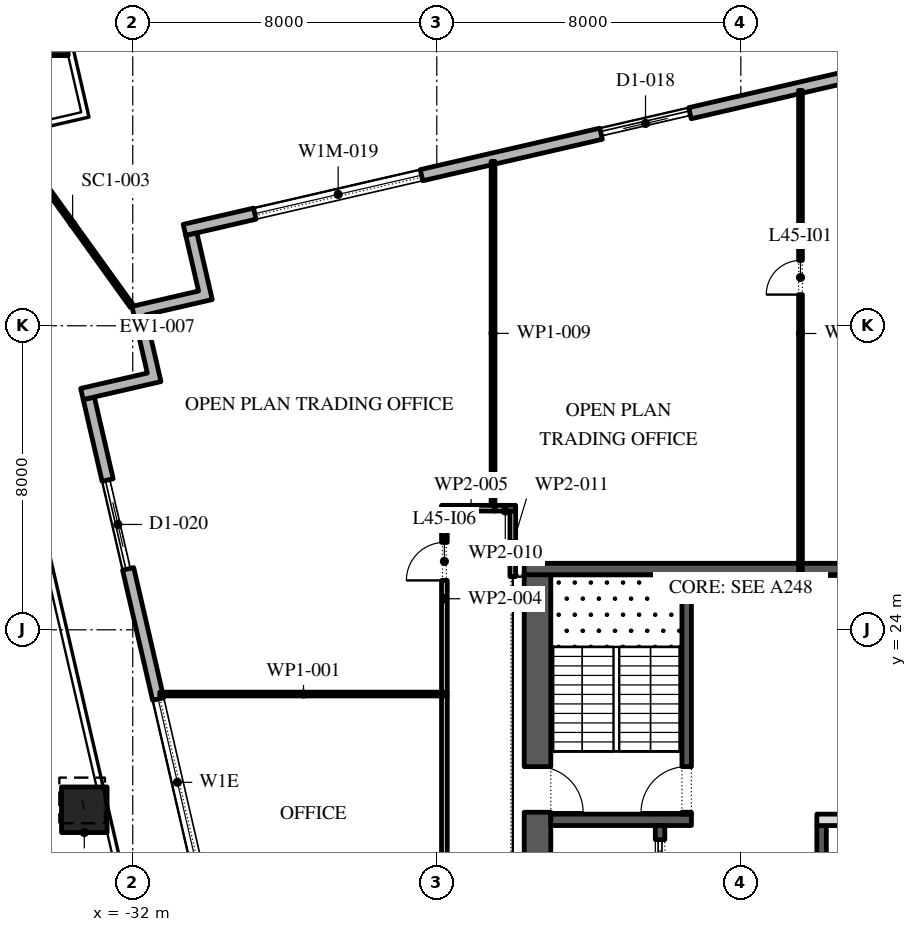
"""IFC4 building model, lengths in metres.
Left out: names, types, materials, properties, quantities, classifications, styles, units other than length and angle.
Written with IfcOpenShell. Run it as: python <this file> out.ifc"""

import sys

from ifc_helpers import new_model, si_unit, direction, frame, frame_2d, origin, origin_2d, place, context, subcontext, project, spatial, polyline, rectangle, outline, extrude, element, fill, save


model = new_model("IFC4")
c1 = context("Model", 3, precision=1e-05, world=origin(), true_north=direction((0.0, 1.0)))
c2 = subcontext(c1, "Body", "Model", "MODEL_VIEW")
j1 = project(units=[si_unit("LENGTHUNIT", "METRE"), si_unit("PLANEANGLEUNIT", "RADIAN")], contexts=[c1])
p1 = place(None, origin())
s1 = spatial("IfcSite", under=j1, at=p1, CompositionType="ELEMENT")
p2 = place(p1, origin())
s2 = spatial("IfcBuilding", under=s1, at=p2, CompositionType="ELEMENT")
p3 = place(p2, frame((0.0, 0.0, 205.2)))
s3 = spatial("IfcBuildingStorey", under=s2, at=p3, CompositionType="ELEMENT", Elevation=205.2)
p4 = place(p3, frame((-34.3, 39.709, 0.0), z_axis=(-0.018883571463, 0.081616417765, 0.996484907603), x_axis=(-0.974262845894, -0.225414966474, 0.0)))
e1 = element("IfcColumn", 1, at=p4, inside=s3, PredefinedType="COLUMN", context=c2, shape_type="SweptSolid", body=[
    extrude(rectangle(XDim=1.2, YDim=1.2, at=origin_2d()), origin(), (0.0, 0.0, 1.0), 4.215),
])
p5 = place(p3, frame((-33.275, 19.265, 0.0), z_axis=(-0.013461799865, 0.058373149415, 0.998204064995), x_axis=(-0.974423835271, -0.224718021653, 0.0)))
e2 = element("IfcColumn", 2, at=p5, inside=s3, PredefinedType="COLUMN", context=c2, shape_type="SweptSolid", body=[
    extrude(rectangle(XDim=1.2, YDim=1.2, at=origin_2d()), origin(), (0.0, 0.0, 1.0), 4.208),
])
p6 = place(p3, frame((17.592, 45.657, 0.0), z_axis=(0.0, 0.0, 1.0), x_axis=(-0.974370243697, -0.224950279389, 0.0)))
e3 = element("IfcWall", 3, at=p6, inside=s3, PredefinedType="STANDARD", context=c2, shape_type="SweptSolid", body=[
    extrude(rectangle(XDim=49.5, YDim=0.3, at=frame_2d((24.75, 0.0))), origin(), (0.0, 0.0, 1.0), 4.0),
])
p7 = place(p6, frame((2.8, 0.0, 0.0)))
e4 = element("IfcOpeningElement", 4, at=p7, cuts=e3, PredefinedType="OPENING", context=c2, shape_type="SweptSolid", body=[
    extrude(rectangle(XDim=2.4, YDim=3.5, at=frame_2d((1.2, 1.75))), frame((0.0, 0.16, 0.0), z_axis=(0.0, -1.0, 0.0), x_axis=(1.0, 0.0, 0.0)), (0.0, 0.0, 1.0), 0.32),
])
p8 = place(p6, frame((9.9, 0.0, 0.45)))
e5 = element("IfcOpeningElement", 5, at=p8, cuts=e3, PredefinedType="OPENING", context=c2, shape_type="SweptSolid", body=[
    extrude(rectangle(XDim=4.5, YDim=2.45, at=frame_2d((2.25, 1.225))), frame((0.0, 0.16, 0.0), z_axis=(0.0, -1.0, 0.0), x_axis=(1.0, 0.0, 0.0)), (0.0, 0.0, 1.0), 0.32),
])
p9 = place(p6, frame((18.2, 0.0, 0.45)))
e6 = element("IfcOpeningElement", 6, at=p9, cuts=e3, PredefinedType="OPENING", context=c2, shape_type="SweptSolid", body=[
    extrude(rectangle(XDim=4.5, YDim=2.45, at=frame_2d((2.25, 1.225))), frame((0.0, 0.16, 0.0), z_axis=(0.0, -1.0, 0.0), x_axis=(1.0, 0.0, 0.0)), (0.0, 0.0, 1.0), 0.32),
])
p10 = place(p6, frame((26.5, 0.0, 0.45)))
e7 = element("IfcOpeningElement", 7, at=p10, cuts=e3, PredefinedType="OPENING", context=c2, shape_type="SweptSolid", body=[
    extrude(rectangle(XDim=4.5, YDim=2.45, at=frame_2d((2.25, 1.225))), frame((0.0, 0.16, 0.0), z_axis=(0.0, -1.0, 0.0), x_axis=(1.0, 0.0, 0.0)), (0.0, 0.0, 1.0), 0.32),
])
p11 = place(p6, frame((35.85, 0.0, 0.0)))
e8 = element("IfcOpeningElement", 8, at=p11, cuts=e3, PredefinedType="OPENING", context=c2, shape_type="SweptSolid", body=[
    extrude(rectangle(XDim=2.4, YDim=3.5, at=frame_2d((1.2, 1.75))), frame((0.0, 0.16, 0.0), z_axis=(0.0, -1.0, 0.0), x_axis=(1.0, 0.0, 0.0)), (0.0, 0.0, 1.0), 0.32),
])
p12 = place(p6, frame((43.1, 0.0, 0.45)))
e9 = element("IfcOpeningElement", 9, at=p12, cuts=e3, PredefinedType="OPENING", context=c2, shape_type="SweptSolid", body=[
    extrude(rectangle(XDim=4.5, YDim=2.575, at=frame_2d((2.25, 1.288))), frame((0.0, 0.16, 0.0), z_axis=(0.0, -1.0, 0.0), x_axis=(1.0, 0.0, 0.0)), (0.0, 0.0, 1.0), 0.32),
])
p13 = place(p3, frame((-33.157, 30.092, 0.0), z_axis=(0.0, 0.0, 1.0), x_axis=(0.224950279389, -0.974370243697, 0.0)))
e10 = element("IfcWall", 10, at=p13, inside=s3, PredefinedType="STANDARD", context=c2, shape_type="SweptSolid", body=[
    extrude(rectangle(XDim=49.5, YDim=0.3, at=frame_2d((24.75, 0.0))), origin(), (0.0, 0.0, 1.0), 4.0),
])
p14 = place(p13, frame((2.207, 0.0, 0.0)))
e11 = element("IfcOpeningElement", 11, at=p14, cuts=e10, PredefinedType="OPENING", context=c2, shape_type="SweptSolid", body=[
    extrude(rectangle(XDim=2.4, YDim=3.5, at=frame_2d((1.2, 1.75))), frame((0.0, 0.16, 0.0), z_axis=(0.0, -1.0, 0.0), x_axis=(1.0, 0.0, 0.0)), (0.0, 0.0, 1.0), 0.32),
])
p15 = place(p13, frame((8.121, 0.0, 0.45)))
e12 = element("IfcOpeningElement", 12, at=p15, cuts=e10, PredefinedType="OPENING", context=c2, shape_type="SweptSolid", body=[
    extrude(rectangle(XDim=4.5, YDim=2.825, at=frame_2d((2.25, 1.413))), frame((0.0, 0.16, 0.0), z_axis=(0.0, -1.0, 0.0), x_axis=(1.0, 0.0, 0.0)), (0.0, 0.0, 1.0), 0.32),
])
p16 = place(p13, frame((15.236, 0.0, 0.45)))
e13 = element("IfcOpeningElement", 13, at=p16, cuts=e10, PredefinedType="OPENING", context=c2, shape_type="SweptSolid", body=[
    extrude(rectangle(XDim=4.5, YDim=2.95, at=frame_2d((2.25, 1.475))), frame((0.0, 0.16, 0.0), z_axis=(0.0, -1.0, 0.0), x_axis=(1.0, 0.0, 0.0)), (0.0, 0.0, 1.0), 0.32),
])
p17 = place(p13, frame((22.35, 0.0, 0.45)))
e14 = element("IfcOpeningElement", 14, at=p17, cuts=e10, PredefinedType="OPENING", context=c2, shape_type="SweptSolid", body=[
    extrude(rectangle(XDim=4.5, YDim=3.0, at=frame_2d((2.25, 1.5))), frame((0.0, 0.16, 0.0), z_axis=(0.0, -1.0, 0.0), x_axis=(1.0, 0.0, 0.0)), (0.0, 0.0, 1.0), 0.32),
])
p18 = place(p13, frame((30.514, 0.0, 0.0)))
e15 = element("IfcOpeningElement", 15, at=p18, cuts=e10, PredefinedType="OPENING", context=c2, shape_type="SweptSolid", body=[
    extrude(rectangle(XDim=2.4, YDim=3.5, at=frame_2d((1.2, 1.75))), frame((0.0, 0.16, 0.0), z_axis=(0.0, -1.0, 0.0), x_axis=(1.0, 0.0, 0.0)), (0.0, 0.0, 1.0), 0.32),
])
p19 = place(p13, frame((36.579, 0.0, 0.45)))
e16 = element("IfcOpeningElement", 16, at=p19, cuts=e10, PredefinedType="OPENING", context=c2, shape_type="SweptSolid", body=[
    extrude(rectangle(XDim=4.5, YDim=3.05, at=frame_2d((2.25, 1.525))), frame((0.0, 0.16, 0.0), z_axis=(0.0, -1.0, 0.0), x_axis=(1.0, 0.0, 0.0)), (0.0, 0.0, 1.0), 0.32),
])
p20 = place(p13, frame((43.693, 0.0, 0.45)))
e17 = element("IfcOpeningElement", 17, at=p20, cuts=e10, PredefinedType="OPENING", context=c2, shape_type="SweptSolid", body=[
    extrude(rectangle(XDim=4.5, YDim=3.05, at=frame_2d((2.25, 1.525))), frame((0.0, 0.16, 0.0), z_axis=(0.0, -1.0, 0.0), x_axis=(1.0, 0.0, 0.0)), (0.0, 0.0, 1.0), 0.32),
])
p21 = place(p3, origin())
e18 = element("IfcWall", 18, at=p21, inside=s3, PredefinedType="STANDARD", context=c2, shape_type="SweptSolid", body=[
    extrude(outline(polyline([(-31.617, 30.756), (-32.022, 32.51), (-30.268, 32.914), (-30.605, 34.376), (-30.313, 34.443), (-29.908, 32.69), (-31.662, 32.285), (-31.257, 30.531), (-33.303, 30.058), (-33.371, 30.351), (-31.617, 30.756)])), origin(), (0.0, 0.0, 1.0), 4.0),
])
p22 = place(p3, frame((-32.022, 32.51, -0.05), z_axis=(0.0, 0.0, 1.0), x_axis=(-0.5840277604, 0.811733684826, 0.0)))
e19 = element("IfcWall", 19, at=p22, inside=s3, PredefinedType="STANDARD", context=c2, shape_type="SweptSolid", body=[
    extrude(rectangle(XDim=5.342, YDim=0.1, at=frame_2d((2.671, 0.0))), origin(), (0.0, 0.0, 1.0), 4.05),
])
p23 = place(p3, frame((-21.35, -2.45, 0.0), z_axis=(0.0, 0.0, 1.0), x_axis=(0.0, 1.0, 0.0)))
e20 = element("IfcWall", 20, at=p23, inside=s3, PredefinedType="SHEAR", context=c2, shape_type="SweptSolid", body=[
    extrude(rectangle(XDim=27.9, YDim=0.7, at=frame_2d((13.95, 0.0))), origin(), (0.0, 0.0, 1.0), 4.0),
])
p24 = place(p23, frame((5.05, 0.0, 0.0)))
e21 = element("IfcOpeningElement", 21, at=p24, cuts=e20, PredefinedType="OPENING", context=c2, shape_type="SweptSolid", body=[
    extrude(rectangle(XDim=1.2, YDim=2.1, at=frame_2d((0.6, 1.05))), frame((0.0, 0.36, 0.0), z_axis=(0.0, -1.0, 0.0), x_axis=(1.0, 0.0, 0.0)), (0.0, 0.0, 1.0), 0.72),
])
p25 = place(p23, frame((21.65, 0.0, 0.0)))
e22 = element("IfcOpeningElement", 22, at=p25, cuts=e20, PredefinedType="OPENING", context=c2, shape_type="SweptSolid", body=[
    extrude(rectangle(XDim=1.2, YDim=2.1, at=frame_2d((0.6, 1.05))), frame((0.0, 0.36, 0.0), z_axis=(0.0, -1.0, 0.0), x_axis=(1.0, 0.0, 0.0)), (0.0, 0.0, 1.0), 0.72),
])
p26 = place(p3, frame((-21.7, 25.6, 0.0), z_axis=(0.0, 0.0, 1.0), x_axis=(1.0, 0.0, 0.0)))
e23 = element("IfcWall", 23, at=p26, inside=s3, PredefinedType="SHEAR", context=c2, shape_type="SweptSolid", body=[
    extrude(rectangle(XDim=11.4, YDim=0.3, at=frame_2d((5.7, 0.0))), origin(), (0.0, 0.0, 1.0), 4.0),
])
p27 = place(p3, frame((-21.0, 19.0, 0.0), z_axis=(0.0, 0.0, 1.0), x_axis=(1.0, 0.0, 0.0)))
e24 = element("IfcWall", 24, at=p27, inside=s3, PredefinedType="SHEAR", context=c2, shape_type="SweptSolid", body=[
    extrude(rectangle(XDim=3.7, YDim=0.3, at=frame_2d((1.85, 0.0))), origin(), (0.0, 0.0, 1.0), 4.0),
])
p28 = place(p3, frame((-17.425, 19.15, 0.0), z_axis=(0.0, 0.0, 1.0), x_axis=(0.0, 1.0, 0.0)))
e25 = element("IfcWall", 25, at=p28, inside=s3, PredefinedType="SHEAR", context=c2, shape_type="SweptSolid", body=[
    extrude(rectangle(XDim=6.3, YDim=0.25, at=frame_2d((3.15, 0.0))), origin(), (0.0, 0.0, 1.0), 4.0),
])
p29 = place(p28, frame((0.05, 0.0, 0.0)))
e26 = element("IfcOpeningElement", 26, at=p29, cuts=e25, PredefinedType="OPENING", context=c2, shape_type="SweptSolid", body=[
    extrude(rectangle(XDim=1.2, YDim=2.1, at=frame_2d((0.6, 1.05))), frame((0.0, 0.135, 0.0), z_axis=(0.0, -1.0, 0.0), x_axis=(1.0, 0.0, 0.0)), (0.0, 0.0, 1.0), 0.27),
])
p30 = place(p3, frame((-18.125, 4.15, 0.0), z_axis=(0.0, 0.0, 1.0), x_axis=(0.0, 1.0, 0.0)))
e27 = element("IfcWall", 27, at=p30, inside=s3, PredefinedType="SHEAR", context=c2, shape_type="SweptSolid", body=[
    extrude(rectangle(XDim=14.7, YDim=0.25, at=frame_2d((7.35, 0.0))), origin(), (0.0, 0.0, 1.0), 4.0),
])
p31 = place(p30, frame((6.9, 0.0, 0.0)))
e28 = element("IfcOpeningElement", 28, at=p31, cuts=e27, PredefinedType="OPENING", context=c2, shape_type="SweptSolid", body=[
    extrude(rectangle(XDim=0.9, YDim=2.1, at=frame_2d((0.45, 1.05))), frame((0.0, 0.135, 0.0), z_axis=(0.0, -1.0, 0.0), x_axis=(1.0, 0.0, 0.0)), (0.0, 0.0, 1.0), 0.27),
])
p32 = place(p30, frame((0.371, 0.0, 0.0)))
e29 = element("IfcOpeningElement", 29, at=p32, cuts=e27, PredefinedType="OPENING", context=c2, shape_type="SweptSolid", body=[
    extrude(rectangle(XDim=1.1, YDim=2.1, at=frame_2d((0.55, 1.05))), frame((0.0, 0.135, 0.0), z_axis=(0.0, -1.0, 0.0), x_axis=(1.0, 0.0, 0.0)), (0.0, 0.0, 1.0), 0.27),
])
p33 = place(p30, frame((13.229, 0.0, 0.0)))
e30 = element("IfcOpeningElement", 30, at=p33, cuts=e27, PredefinedType="OPENING", context=c2, shape_type="SweptSolid", body=[
    extrude(rectangle(XDim=1.1, YDim=2.1, at=frame_2d((0.55, 1.05))), frame((0.0, 0.135, 0.0), z_axis=(0.0, -1.0, 0.0), x_axis=(1.0, 0.0, 0.0)), (0.0, 0.0, 1.0), 0.27),
])
p34 = place(p3, frame((-13.875, -2.45, 0.0), z_axis=(0.0, 0.0, 1.0), x_axis=(0.0, 1.0, 0.0)))
e31 = element("IfcWall", 31, at=p34, inside=s3, PredefinedType="SHEAR", context=c2, shape_type="SweptSolid", body=[
    extrude(rectangle(XDim=21.3, YDim=0.25, at=frame_2d((10.65, 0.0))), origin(), (0.0, 0.0, 1.0), 4.0),
])
p35 = place(p34, frame((17.786, 0.0, 0.0)))
e32 = element("IfcOpeningElement", 32, at=p35, cuts=e31, PredefinedType="OPENING", context=c2, shape_type="SweptSolid", body=[
    extrude(rectangle(XDim=0.9, YDim=2.1, at=frame_2d((0.45, 1.05))), frame((0.0, 0.135, 0.0), z_axis=(0.0, -1.0, 0.0), x_axis=(1.0, 0.0, 0.0)), (0.0, 0.0, 1.0), 0.27),
])
p36 = place(p34, frame((6.971, 0.0, 0.0)))
e33 = element("IfcOpeningElement", 33, at=p36, cuts=e31, PredefinedType="OPENING", context=c2, shape_type="SweptSolid", body=[
    extrude(rectangle(XDim=1.1, YDim=2.1, at=frame_2d((0.55, 1.05))), frame((0.0, 0.135, 0.0), z_axis=(0.0, -1.0, 0.0), x_axis=(1.0, 0.0, 0.0)), (0.0, 0.0, 1.0), 0.27),
])
p37 = place(p34, frame((9.114, 0.0, 0.0)))
e34 = element("IfcOpeningElement", 34, at=p37, cuts=e31, PredefinedType="OPENING", context=c2, shape_type="SweptSolid", body=[
    extrude(rectangle(XDim=1.1, YDim=2.1, at=frame_2d((0.55, 1.05))), frame((0.0, 0.135, 0.0), z_axis=(0.0, -1.0, 0.0), x_axis=(1.0, 0.0, 0.0)), (0.0, 0.0, 1.0), 0.27),
])
p38 = place(p34, frame((11.257, 0.0, 0.0)))
e35 = element("IfcOpeningElement", 35, at=p38, cuts=e31, PredefinedType="OPENING", context=c2, shape_type="SweptSolid", body=[
    extrude(rectangle(XDim=1.1, YDim=2.1, at=frame_2d((0.55, 1.05))), frame((0.0, 0.135, 0.0), z_axis=(0.0, -1.0, 0.0), x_axis=(1.0, 0.0, 0.0)), (0.0, 0.0, 1.0), 0.27),
])
p39 = place(p34, frame((13.4, 0.0, 0.0)))
e36 = element("IfcOpeningElement", 36, at=p39, cuts=e31, PredefinedType="OPENING", context=c2, shape_type="SweptSolid", body=[
    extrude(rectangle(XDim=1.1, YDim=2.1, at=frame_2d((0.55, 1.05))), frame((0.0, 0.135, 0.0), z_axis=(0.0, -1.0, 0.0), x_axis=(1.0, 0.0, 0.0)), (0.0, 0.0, 1.0), 0.27),
])
p40 = place(p3, frame((-14.0, 19.0, 0.0), z_axis=(0.0, 0.0, 1.0), x_axis=(1.0, 0.0, 0.0)))
e37 = element("IfcWall", 37, at=p40, inside=s3, PredefinedType="PARTITIONING", context=c2, shape_type="SweptSolid", body=[
    extrude(rectangle(XDim=3.0, YDim=0.3, at=frame_2d((1.5, 0.0))), origin(), (0.0, 0.0, 1.0), 4.0),
])
p41 = place(p3, frame((-31.289, 22.31, 0.0), z_axis=(0.0, 0.0, 1.0), x_axis=(1.0, 0.0, 0.0)))
e38 = element("IfcWall", 38, at=p41, inside=s3, PredefinedType="PARTITIONING", context=c2, shape_type="SweptSolid", body=[
    extrude(rectangle(XDim=7.564, YDim=0.1, at=frame_2d((3.782, 0.0))), origin(), (0.0, 0.0, 1.0), 4.0),
])
p42 = place(p3, frame((-23.8, -5.075, 0.0), z_axis=(0.0, 0.0, 1.0), x_axis=(0.0, 1.0, 0.0)))
e39 = element("IfcWall", 39, at=p42, inside=s3, PredefinedType="PARTITIONING", context=c2, shape_type="SweptSolid", body=[
    extrude(rectangle(XDim=27.335, YDim=0.15, at=frame_2d((13.667, 0.0))), origin(), (0.0, 0.0, 1.0), 4.0),
])
p43 = place(p42, frame((15.985, 0.0, 0.0)))
e40 = element("IfcOpeningElement", 40, at=p43, cuts=e39, PredefinedType="OPENING", context=c2, shape_type="SweptSolid", body=[
    extrude(rectangle(XDim=1.0, YDim=2.1, at=frame_2d((0.5, 1.05))), frame((0.0, 0.085, 0.0), z_axis=(0.0, -1.0, 0.0), x_axis=(1.0, 0.0, 0.0)), (0.0, 0.0, 1.0), 0.17),
])
p44 = place(p3, frame((-23.8, 22.36, 0.0), z_axis=(0.0, 0.0, 1.0), x_axis=(0.0, 1.0, 0.0)))
e41 = element("IfcWall", 41, at=p44, inside=s3, PredefinedType="PARTITIONING", context=c2, shape_type="SweptSolid", body=[
    extrude(rectangle(XDim=4.915, YDim=0.15, at=frame_2d((2.458, 0.0))), origin(), (0.0, 0.0, 1.0), 4.0),
])
p45 = place(p44, frame((2.94, 0.0, 0.0)))
e42 = element("IfcOpeningElement", 42, at=p45, cuts=e41, PredefinedType="OPENING", context=c2, shape_type="SweptSolid", body=[
    extrude(rectangle(XDim=1.0, YDim=2.1, at=frame_2d((0.5, 1.05))), frame((0.0, 0.085, 0.0), z_axis=(0.0, -1.0, 0.0), x_axis=(1.0, 0.0, 0.0)), (0.0, 0.0, 1.0), 0.17),
])
p46 = place(p3, frame((-23.725, 27.2, 0.0), z_axis=(0.0, 0.0, 1.0), x_axis=(1.0, 0.0, 0.0)))
e43 = element("IfcWall", 43, at=p46, inside=s3, PredefinedType="PARTITIONING", context=c2, shape_type="SweptSolid", body=[
    extrude(rectangle(XDim=1.255, YDim=0.15, at=frame_2d((0.627, 0.0))), origin(), (0.0, 0.0, 1.0), 4.0),
])
p47 = place(p3, frame((-22.52, 27.275, 0.0), z_axis=(0.0, 0.0, 1.0), x_axis=(0.0, 1.0, 0.0)))
e44 = element("IfcWall", 44, at=p47, inside=s3, PredefinedType="PARTITIONING", context=c2, shape_type="SweptSolid", body=[
    extrude(rectangle(XDim=9.05, YDim=0.1, at=frame_2d((4.525, 0.0))), origin(), (0.0, 0.0, 1.0), 4.0),
])
p48 = place(p3, frame((-22.47, 27.2, 0.0), z_axis=(0.0, 0.0, 1.0), x_axis=(1.0, 0.0, 0.0)))
e45 = element("IfcWall", 45, at=p48, inside=s3, PredefinedType="PARTITIONING", context=c2, shape_type="SweptSolid", body=[
    extrude(rectangle(XDim=0.545, YDim=0.15, at=frame_2d((0.272, 0.0))), origin(), (0.0, 0.0, 1.0), 4.0),
])
p49 = place(p3, frame((-22.0, 27.125, 0.0), z_axis=(0.0, 0.0, 1.0), x_axis=(0.0, -1.0, 0.0)))
e46 = element("IfcWall", 46, at=p49, inside=s3, PredefinedType="PARTITIONING", context=c2, shape_type="SweptSolid", body=[
    extrude(rectangle(XDim=1.725, YDim=0.15, at=frame_2d((0.863, 0.0))), origin(), (0.0, 0.0, 1.0), 4.0),
])
p50 = place(p3, frame((-14.43, 38.193, 0.0), z_axis=(0.0, 0.0, 1.0), x_axis=(0.0, -1.0, 0.0)))
e47 = element("IfcWall", 47, at=p50, inside=s3, PredefinedType="PARTITIONING", context=c2, shape_type="SweptSolid", body=[
    extrude(rectangle(XDim=12.793, YDim=0.1, at=frame_2d((6.396, 0.0))), origin(), (0.0, 0.0, 1.0), 4.0),
])
p51 = place(p50, frame((4.473, 0.0, 0.0)))
e48 = element("IfcOpeningElement", 48, at=p51, cuts=e47, PredefinedType="OPENING", context=c2, shape_type="SweptSolid", body=[
    extrude(rectangle(XDim=0.9, YDim=2.1, at=frame_2d((0.45, 1.05))), frame((0.0, 0.06, 0.0), z_axis=(0.0, -1.0, 0.0), x_axis=(1.0, 0.0, 0.0)), (0.0, 0.0, 1.0), 0.12),
])
p52 = place(p11, origin())
e49 = element("IfcDoor", 49, at=p52, inside=s3, OperationType="DOUBLE_DOOR_SLIDING", PredefinedType="DOOR", context=c2, shape_type="SweptSolid", body=[
    extrude(rectangle(XDim=2.4, YDim=3.5, at=frame_2d((1.2, 1.75))), frame((0.0, 0.025, 0.0), z_axis=(0.0, -1.0, 0.0), x_axis=(1.0, 0.0, 0.0)), (0.0, 0.0, 1.0), 0.05),
])
fill(e8, e49)
p53 = place(p12, origin())
e50 = element("IfcWindow", 50, at=p53, inside=s3, PartitioningType="DOUBLE_PANEL_VERTICAL", PredefinedType="WINDOW", context=c2, shape_type="SweptSolid", body=[
    extrude(rectangle(XDim=4.5, YDim=2.575, at=frame_2d((2.25, 1.288))), frame((0.0, 0.03, 0.0), z_axis=(0.0, -1.0, 0.0), x_axis=(1.0, 0.0, 0.0)), (0.0, 0.0, 1.0), 0.06),
])
fill(e9, e50)
p54 = place(p14, origin())
e51 = element("IfcDoor", 51, at=p54, inside=s3, OperationType="DOUBLE_DOOR_SLIDING", PredefinedType="DOOR", context=c2, shape_type="SweptSolid", body=[
    extrude(rectangle(XDim=2.4, YDim=3.5, at=frame_2d((1.2, 1.75))), frame((0.0, 0.025, 0.0), z_axis=(0.0, -1.0, 0.0), x_axis=(1.0, 0.0, 0.0)), (0.0, 0.0, 1.0), 0.05),
])
fill(e11, e51)
p55 = place(p15, origin())
e52 = element("IfcWindow", 52, at=p55, inside=s3, PartitioningType="DOUBLE_PANEL_VERTICAL", PredefinedType="WINDOW", context=c2, shape_type="SweptSolid", body=[
    extrude(rectangle(XDim=4.5, YDim=2.825, at=frame_2d((2.25, 1.413))), frame((0.0, 0.03, 0.0), z_axis=(0.0, -1.0, 0.0), x_axis=(1.0, 0.0, 0.0)), (0.0, 0.0, 1.0), 0.06),
])
fill(e12, e52)
p56 = place(p33, origin())
e53 = element("IfcDoor", 53, at=p56, inside=s3, OperationType="SLIDING_TO_LEFT", PredefinedType="DOOR", context=c2, shape_type="SweptSolid", body=[
    extrude(rectangle(XDim=1.1, YDim=2.1, at=frame_2d((0.55, 1.05))), frame((0.0, 0.025, 0.0), z_axis=(0.0, -1.0, 0.0), x_axis=(1.0, 0.0, 0.0)), (0.0, 0.0, 1.0), 0.05),
])
fill(e30, e53)
p57 = place(p29, origin())
e54 = element("IfcDoor", 54, at=p57, inside=s3, OperationType="SINGLE_SWING_RIGHT", PredefinedType="DOOR", context=c2, shape_type="SweptSolid", body=[
    extrude(rectangle(XDim=1.2, YDim=2.1, at=frame_2d((0.6, 1.05))), frame((0.0, 0.025, 0.0), z_axis=(0.0, -1.0, 0.0), x_axis=(1.0, 0.0, 0.0)), (0.0, 0.0, 1.0), 0.05),
])
fill(e26, e54)
p58 = place(p25, frame((1.2, 0.0, 0.0), z_axis=(0.0, 0.0, 1.0), x_axis=(-1.0, 0.0, 0.0)))
e55 = element("IfcDoor", 55, at=p58, inside=s3, OperationType="SINGLE_SWING_LEFT", PredefinedType="DOOR", context=c2, shape_type="SweptSolid", body=[
    extrude(rectangle(XDim=1.2, YDim=2.1, at=frame_2d((0.6, 1.05))), frame((0.0, 0.025, 0.0), z_axis=(0.0, -1.0, 0.0), x_axis=(1.0, 0.0, 0.0)), (0.0, 0.0, 1.0), 0.05),
])
fill(e22, e55)
p59 = place(p51, frame((0.9, 0.0, 0.0), z_axis=(0.0, 0.0, 1.0), x_axis=(-1.0, 0.0, 0.0)))
e56 = element("IfcDoor", 56, at=p59, inside=s3, OperationType="SINGLE_SWING_RIGHT", PredefinedType="DOOR", context=c2, shape_type="SweptSolid", body=[
    extrude(rectangle(XDim=0.9, YDim=2.1, at=frame_2d((0.45, 1.05))), frame((0.0, 0.025, 0.0), z_axis=(0.0, -1.0, 0.0), x_axis=(1.0, 0.0, 0.0)), (0.0, 0.0, 1.0), 0.05),
])
fill(e48, e56)
p60 = place(p45, origin())
e57 = element("IfcDoor", 57, at=p60, inside=s3, OperationType="SINGLE_SWING_RIGHT", PredefinedType="DOOR", context=c2, shape_type="SweptSolid", body=[
    extrude(rectangle(XDim=1.0, YDim=2.1, at=frame_2d((0.5, 1.05))), frame((0.0, 0.025, 0.0), z_axis=(0.0, -1.0, 0.0), x_axis=(1.0, 0.0, 0.0)), (0.0, 0.0, 1.0), 0.05),
])
fill(e42, e57)
save(model, sys.argv[1])
